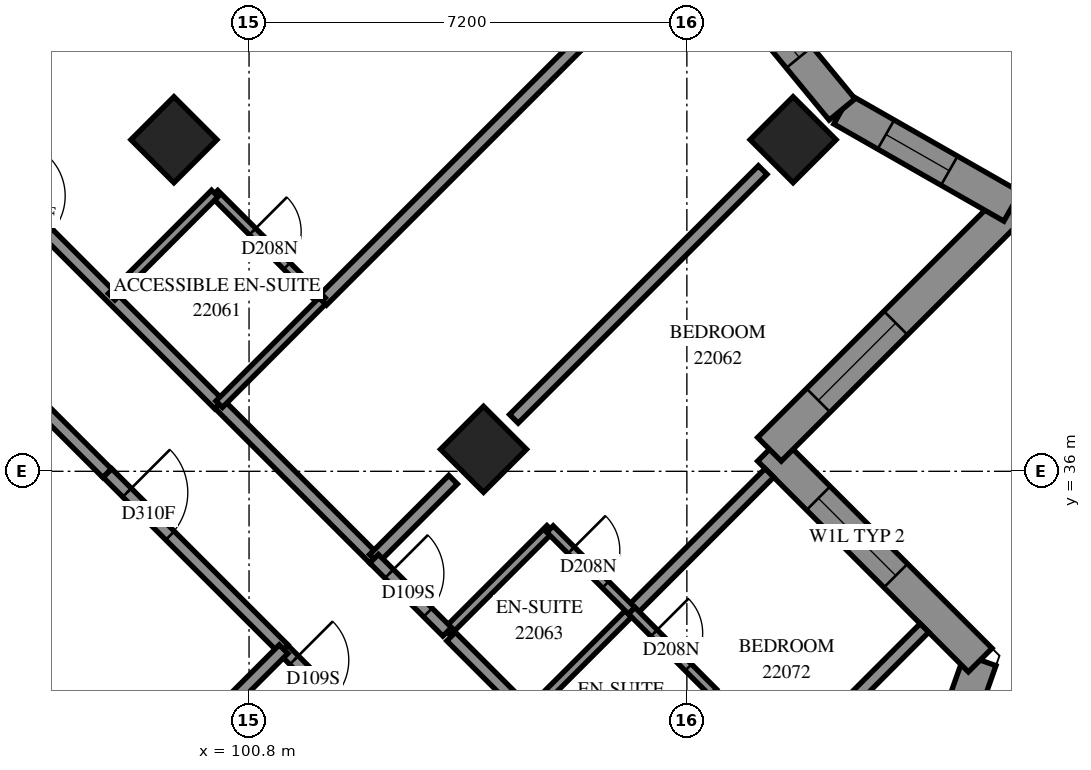
"""IFC4 building model, lengths in metres.
Left out: names, types, materials, properties, quantities, classifications, styles, units other than length and angle.
Written with IfcOpenShell. Run it as: python <this file> out.ifc"""

import sys

from ifc_helpers import new_model, si_unit, direction, frame, frame_2d, origin, origin_2d, place, context, subcontext, project, spatial, polyline, rectangle, outline, extrude, element, fill, save


model = new_model("IFC4")
c1 = context("Model", 3, precision=1e-05, world=origin(), true_north=direction((0.0, 1.0)))
c2 = subcontext(c1, "Body", "Model", "MODEL_VIEW")
j1 = project(units=[si_unit("LENGTHUNIT", "METRE"), si_unit("PLANEANGLEUNIT", "RADIAN")], contexts=[c1])
p1 = place(None, origin())
s1 = spatial("IfcSite", under=j1, at=p1, CompositionType="ELEMENT")
p2 = place(p1, origin())
s2 = spatial("IfcBuilding", under=s1, at=p2, CompositionType="ELEMENT")
p3 = place(p2, frame((0.0, 0.0, 84.6)))
s3 = spatial("IfcBuildingStorey", under=s2, at=p3, CompositionType="ELEMENT", Elevation=84.6)
for number, where, z_axis, x_axis in (
    (1, (99.565, 41.453, 0.0), (0.0, 0.0, 1.0), (0.707, -0.707, 0.0)),
    (2, (109.747, 41.453, 0.0), (0.0, 0.0, 1.0), (0.707, -0.707, 0.0)),
    (3, (104.656, 36.362, 0.0), (0.0, 0.0, 1.0), (0.707, -0.707, 0.0)),
):
    element("IfcColumn", number, at=place(p3, frame(where, z_axis=z_axis, x_axis=x_axis)), inside=s3, PredefinedType="COLUMN", context=c2, shape_type="SweptSolid", body=[
        extrude(rectangle(XDim=1.0, YDim=1.0, at=origin_2d()), origin(), (0.0, 0.0, 1.0), 3.1),
    ])
p4 = place(p3, frame((87.12, 38.625, -0.3), z_axis=(0.0, 0.0, 1.0), x_axis=(0.7071067812, 0.7071067812, 0.0)))
e4 = element("IfcWall", 4, at=p4, inside=s3, PredefinedType="SHEAR", context=c2, shape_type="SweptSolid", body=[
    extrude(rectangle(XDim=14.4, YDim=0.8, at=frame_2d((7.2, 0.0))), origin(), (0.0, 0.0, 1.0), 2.7),
])
p5 = place(p4, frame((4.55, 0.0, 0.3)))
e5 = element("IfcOpeningElement", 5, at=p5, cuts=e4, PredefinedType="OPENING", context=c2, shape_type="SweptSolid", body=[
    extrude(rectangle(XDim=1.1, YDim=2.1, at=frame_2d((0.55, 1.05))), frame((0.0, 0.41, 0.0), z_axis=(0.0, -1.0, 0.0), x_axis=(1.0, 0.0, 0.0)), (0.0, 0.0, 1.0), 0.82),
])
p6 = place(p4, frame((11.35, 0.0, 0.3)))
e6 = element("IfcOpeningElement", 6, at=p6, cuts=e4, PredefinedType="OPENING", context=c2, shape_type="SweptSolid", body=[
    extrude(rectangle(XDim=1.1, YDim=2.1, at=frame_2d((0.55, 1.05))), frame((0.0, 0.41, 0.0), z_axis=(0.0, -1.0, 0.0), x_axis=(1.0, 0.0, 0.0)), (0.0, 0.0, 1.0), 0.82),
])
p7 = place(p3, frame((111.062, 27.922, 0.0), z_axis=(0.0, 0.0, 1.0), x_axis=(0.3338559134, 0.9426241187, 0.0)))
e7 = element("IfcWall", 7, at=p7, inside=s3, PredefinedType="SOLIDWALL", context=c2, shape_type="SweptSolid", body=[
    extrude(outline(polyline([(-0.126, -0.275), (5.45, -0.275), (5.103, 0.275), (0.126, 0.275), (-0.126, -0.275)])), origin(), (0.0, 0.0, 1.0), 3.1),
])
p8 = place(p7, frame((1.441, 0.0, 0.5)))
e8 = element("IfcOpeningElement", 8, at=p8, cuts=e7, PredefinedType="OPENING", context=c2, shape_type="SweptSolid", body=[
    extrude(rectangle(XDim=1.3, YDim=2.45, at=frame_2d((0.65, 1.225))), frame((0.0, 0.285, 0.0), z_axis=(0.0, -1.0, 0.0), x_axis=(1.0, 0.0, 0.0)), (0.0, 0.0, 1.0), 0.57),
])
p9 = place(p7, frame((2.941, 0.0, 0.5)))
e9 = element("IfcOpeningElement", 9, at=p9, cuts=e7, PredefinedType="OPENING", context=c2, shape_type="SweptSolid", body=[
    extrude(rectangle(XDim=1.3, YDim=2.45, at=frame_2d((0.65, 1.225))), frame((0.0, 0.285, 0.0), z_axis=(0.0, -1.0, 0.0), x_axis=(1.0, 0.0, 0.0)), (0.0, 0.0, 1.0), 0.57),
])
p10 = place(p3, frame((112.824, 32.896, 0.0), z_axis=(0.0, 0.0, 1.0), x_axis=(-0.7070965801, 0.7071169822, 0.0)))
e10 = element("IfcWall", 10, at=p10, inside=s3, PredefinedType="SOLIDWALL", context=c2, shape_type="SweptSolid", body=[
    extrude(outline(polyline([(-0.173, -0.275), (4.627, -0.275), (5.176, 0.275), (0.173, 0.275), (-0.173, -0.275)])), origin(), (0.0, 0.0, 1.0), 3.1),
])
p11 = place(p10, frame((1.964, 0.0, 0.6)))
e11 = element("IfcOpeningElement", 11, at=p11, cuts=e10, PredefinedType="OPENING", context=c2, shape_type="SweptSolid", body=[
    extrude(rectangle(XDim=1.8, YDim=1.9, at=frame_2d((0.9, 0.95))), frame((0.0, 0.285, 0.0), z_axis=(0.0, -1.0, 0.0), x_axis=(1.0, 0.0, 0.0)), (0.0, 0.0, 1.0), 0.57),
])
p12 = place(p3, frame((109.358, 36.362, 0.0), z_axis=(0.0, 0.0, 1.0), x_axis=(0.7071067812, 0.7071067812, 0.0)))
e12 = element("IfcWall", 12, at=p12, inside=s3, PredefinedType="SOLIDWALL", context=c2, shape_type="SweptSolid", body=[
    extrude(outline(polyline([(0.275, -0.275), (6.005, -0.275), (5.285, 0.275), (-0.275, 0.275), (0.275, -0.275)])), origin(), (0.0, 0.0, 1.0), 3.1),
])
p13 = place(p12, frame((1.137, 0.0, 0.6)))
e13 = element("IfcOpeningElement", 13, at=p13, cuts=e12, PredefinedType="OPENING", context=c2, shape_type="SweptSolid", body=[
    extrude(rectangle(XDim=1.8, YDim=1.9, at=frame_2d((0.9, 0.95))), frame((0.0, 0.285, 0.0), z_axis=(0.0, -1.0, 0.0), x_axis=(1.0, 0.0, 0.0)), (0.0, 0.0, 1.0), 0.57),
])
p14 = place(p3, frame((113.35, 40.353, 0.0), z_axis=(0.0, 0.0, 1.0), x_axis=(-0.8684016794, 0.4958613951, 0.0)))
e14 = element("IfcWall", 14, at=p14, inside=s3, PredefinedType="SOLIDWALL", context=c2, shape_type="SweptSolid", body=[
    extrude(outline(polyline([(-0.36, -0.275), (3.17, -0.275), (3.271, 0.275), (0.36, 0.275), (-0.36, -0.275)])), origin(), (0.0, 0.0, 1.0), 3.1),
])
p15 = place(p14, frame((1.19, 0.0, 0.5)))
e15 = element("IfcOpeningElement", 15, at=p15, cuts=e14, PredefinedType="OPENING", context=c2, shape_type="SweptSolid", body=[
    extrude(rectangle(XDim=1.2, YDim=2.45, at=frame_2d((0.6, 1.225))), frame((0.0, 0.285, 0.0), z_axis=(0.0, -1.0, 0.0), x_axis=(1.0, 0.0, 0.0)), (0.0, 0.0, 1.0), 0.57),
])
p16 = place(p3, frame((110.553, 41.95, 0.0), z_axis=(0.0, 0.0, 1.0), x_axis=(-0.6356085732, 0.7720114906, 0.0)))
e16 = element("IfcWall", 16, at=p16, inside=s3, PredefinedType="SOLIDWALL", context=c2, shape_type="SweptSolid", body=[
    extrude(outline(polyline([(0.051, -0.275), (3.472, -0.275), (3.419, 0.275), (-0.051, 0.275), (0.051, -0.275)])), origin(), (0.0, 0.0, 1.0), 3.1),
])
p17 = place(p16, frame((1.109, 0.0, 0.5)))
e17 = element("IfcOpeningElement", 17, at=p17, cuts=e16, PredefinedType="OPENING", context=c2, shape_type="SweptSolid", body=[
    extrude(rectangle(XDim=1.2, YDim=2.45, at=frame_2d((0.6, 1.225))), frame((0.0, 0.285, 0.0), z_axis=(0.0, -1.0, 0.0), x_axis=(1.0, 0.0, 0.0)), (0.0, 0.0, 1.0), 0.57),
])
p18 = place(p3, frame((95.215, 42.197, 0.0), z_axis=(0.0, 0.0, 1.0), x_axis=(0.7071114753, 0.7071020871, 0.0)))
e18 = element("IfcWall", 18, at=p18, inside=s3, PredefinedType="PARTITIONING", context=c2, shape_type="SweptSolid", body=[
    extrude(rectangle(XDim=10.652, YDim=0.2, at=frame_2d((5.326, 0.0))), origin(), (0.0, 0.0, 1.0), 3.1),
])
p19 = place(p3, frame((94.294, 43.111, 0.0), z_axis=(0.0, 0.0, 1.0), x_axis=(0.7071067812, -0.7071067812, 0.0)))
e19 = element("IfcWall", 19, at=p19, inside=s3, PredefinedType="PARTITIONING", context=c2, shape_type="SweptSolid", body=[
    extrude(rectangle(XDim=8.499, YDim=0.2, at=frame_2d((4.25, 0.0))), origin(), (0.0, 0.0, 1.0), 3.1),
])
p20 = place(p19, frame((3.651, 0.0, 0.0)))
e20 = element("IfcOpeningElement", 20, at=p20, cuts=e19, PredefinedType="OPENING", context=c2, shape_type="SweptSolid", body=[
    extrude(rectangle(XDim=0.9, YDim=2.1, at=frame_2d((0.45, 1.05))), frame((0.0, 0.11, 0.0), z_axis=(0.0, -1.0, 0.0), x_axis=(1.0, 0.0, 0.0)), (0.0, 0.0, 1.0), 0.22),
])
p21 = place(p3, frame((102.002, 38.804, 0.0), z_axis=(0.0, 0.0, 1.0), x_axis=(0.7072394704, 0.7069740671, 0.0)))
e21 = element("IfcWall", 21, at=p21, inside=s3, PredefinedType="PARTITIONING", context=c2, shape_type="SweptSolid", body=[
    extrude(rectangle(XDim=8.289, YDim=0.2, at=frame_2d((4.145, 0.0))), origin(), (0.0, 0.0, 1.0), 3.1),
])
p22 = place(p3, frame((101.365, 33.071, 0.0), z_axis=(0.0, 0.0, 1.0), x_axis=(0.7071067812, -0.7071067812, 0.0)))
e22 = element("IfcWall", 22, at=p22, inside=s3, PredefinedType="PARTITIONING", context=c2, shape_type="SweptSolid", body=[
    extrude(rectangle(XDim=7.2, YDim=0.2, at=frame_2d((3.6, 0.0))), origin(), (0.0, 0.0, 1.0), 3.1),
])
p23 = place(p22, frame((0.248, 0.0, 0.0)))
e23 = element("IfcOpeningElement", 23, at=p23, cuts=e22, PredefinedType="OPENING", context=c2, shape_type="SweptSolid", body=[
    extrude(rectangle(XDim=0.9, YDim=2.1, at=frame_2d((0.45, 1.05))), frame((0.0, 0.11, 0.0), z_axis=(0.0, -1.0, 0.0), x_axis=(1.0, 0.0, 0.0)), (0.0, 0.0, 1.0), 0.22),
])
p24 = place(p22, frame((5.95, 0.0, 0.0)))
e24 = element("IfcOpeningElement", 24, at=p24, cuts=e22, PredefinedType="OPENING", context=c2, shape_type="SweptSolid", body=[
    extrude(rectangle(XDim=0.9, YDim=2.1, at=frame_2d((0.45, 1.05))), frame((0.0, 0.11, 0.0), z_axis=(0.0, -1.0, 0.0), x_axis=(1.0, 0.0, 0.0)), (0.0, 0.0, 1.0), 0.22),
])
p25 = place(p3, frame((105.155, 36.863, 0.0), z_axis=(0.0, 0.0, 1.0), x_axis=(0.7071067812, 0.7071067812, 0.0)))
e25 = element("IfcWall", 25, at=p25, inside=s3, PredefinedType="PARTITIONING", context=c2, shape_type="SweptSolid", body=[
    extrude(rectangle(XDim=5.787, YDim=0.2, at=frame_2d((2.893, 0.0))), origin(), (0.0, 0.0, 1.0), 3.1),
])
p26 = place(p3, frame((104.123, 33.282, 0.0), z_axis=(0.0, 0.0, 1.0), x_axis=(0.7071067812, -0.7071067812, 0.0)))
e26 = element("IfcWall", 26, at=p26, inside=s3, PredefinedType="PARTITIONING", context=c2, shape_type="SweptSolid", body=[
    extrude(rectangle(XDim=5.399, YDim=0.2, at=frame_2d((2.7, 0.0))), origin(), (0.0, 0.0, 1.0), 3.1),
])
p27 = place(p26, frame((4.08, 0.0, 0.0)))
e27 = element("IfcOpeningElement", 27, at=p27, cuts=e26, PredefinedType="OPENING", context=c2, shape_type="SweptSolid", body=[
    extrude(rectangle(XDim=0.9, YDim=2.1, at=frame_2d((0.45, 1.05))), frame((0.0, 0.11, 0.0), z_axis=(0.0, -1.0, 0.0), x_axis=(1.0, 0.0, 0.0)), (0.0, 0.0, 1.0), 0.22),
])
p28 = place(p3, frame((98.469, 35.973, 0.0), z_axis=(0.0, 0.0, 1.0), x_axis=(0.7073506531, -0.7068628251, 0.0)))
e28 = element("IfcWall", 28, at=p28, inside=s3, PredefinedType="PARTITIONING", context=c2, shape_type="SweptSolid", body=[
    extrude(rectangle(XDim=4.1, YDim=0.2, at=frame_2d((2.05, 0.0))), origin(), (0.0, 0.0, 1.0), 3.1),
])
p29 = place(p28, frame((0.457, 0.0, 0.0)))
e29 = element("IfcOpeningElement", 29, at=p29, cuts=e28, PredefinedType="OPENING", context=c2, shape_type="SweptSolid", body=[
    extrude(rectangle(XDim=1.0, YDim=2.1, at=frame_2d((0.5, 1.05))), frame((0.0, 0.11, 0.0), z_axis=(0.0, -1.0, 0.0), x_axis=(1.0, 0.0, 0.0)), (0.0, 0.0, 1.0), 0.22),
])
p30 = place(p3, frame((100.31, 37.106, 0.0), z_axis=(0.0, 0.0, 1.0), x_axis=(0.7073845681, -0.7068288851, 0.0)))
e30 = element("IfcWall", 30, at=p30, inside=s3, PredefinedType="PARTITIONING", context=c2, shape_type="SweptSolid", body=[
    extrude(rectangle(XDim=3.599, YDim=0.2, at=frame_2d((1.8, 0.0))), origin(), (0.0, 0.0, 1.0), 3.1),
])
p31 = place(p3, frame((107.095, 33.711, 0.0), z_axis=(0.0, 0.0, 1.0), x_axis=(0.7071067812, 0.7071067812, 0.0)))
e31 = element("IfcWall", 31, at=p31, inside=s3, PredefinedType="PARTITIONING", context=c2, shape_type="SweptSolid", body=[
    extrude(rectangle(XDim=3.2, YDim=0.2, at=frame_2d((1.6, 0.0))), origin(), (0.0, 0.0, 1.0), 3.1),
])
p32 = place(p3, frame((96.274, 38.162, 0.0), z_axis=(0.0, 0.0, 1.0), x_axis=(0.7071067812, -0.7071067812, 0.0)))
e32 = element("IfcWall", 32, at=p32, inside=s3, PredefinedType="PARTITIONING", context=c2, shape_type="SweptSolid", body=[
    extrude(rectangle(XDim=3.1, YDim=0.2, at=frame_2d((1.55, 0.0))), origin(), (0.0, 0.0, 1.0), 3.1),
])
p33 = place(p3, frame((100.233, 40.567, 0.0), z_axis=(0.0, 0.0, 1.0), x_axis=(0.7071067812, -0.7071067812, 0.0)))
e33 = element("IfcWall", 33, at=p33, inside=s3, PredefinedType="PARTITIONING", context=c2, shape_type="SweptSolid", body=[
    extrude(rectangle(XDim=2.5, YDim=0.15, at=frame_2d((1.25, 0.0))), origin(), (0.0, 0.0, 1.0), 3.1),
])
p34 = place(p33, frame((0.883, 0.0, 0.0)))
e34 = element("IfcOpeningElement", 34, at=p34, cuts=e33, PredefinedType="OPENING", context=c2, shape_type="SweptSolid", body=[
    extrude(rectangle(XDim=0.8, YDim=2.1, at=frame_2d((0.4, 1.05))), frame((0.0, 0.085, 0.0), z_axis=(0.0, -1.0, 0.0), x_axis=(1.0, 0.0, 0.0)), (0.0, 0.0, 1.0), 0.17),
])
for number, where, z_axis, x_axis in (
    (35, (98.541, 38.871, 0.0), (0.0, 0.0, 1.0), (0.707, 0.708, 0.0)),
    (36, (100.308, 37.103, 0.0), (0.0, 0.0, 1.0), (0.707, 0.708, 0.0)),
    (37, (105.396, 32.016, 0.0), (0.0, 0.0, 1.0), (0.708, 0.707, 0.0)),
):
    element("IfcWall", number, at=place(p3, frame(where, z_axis=z_axis, x_axis=x_axis)), inside=s3, PredefinedType="PARTITIONING", context=c2, shape_type="SweptSolid", body=[
        extrude(rectangle(XDim=2.4, YDim=0.15, at=frame_2d((1.2, 0.0))), origin(), (0.0, 0.0, 1.0), 3.1),
    ])
for number, where, z_axis, x_axis in (
    (38, (104.055, 33.359, 0.0), (0.0, 0.0, 1.0), (0.707, 0.707, 0.0)),
    (39, (106.741, 30.671, 0.0), (0.0, 0.0, 1.0), (0.707, 0.707, 0.0)),
):
    element("IfcWall", number, at=place(p3, frame(where, z_axis=z_axis, x_axis=x_axis)), inside=s3, PredefinedType="PARTITIONING", context=c2, shape_type="SweptSolid", body=[
        extrude(rectangle(XDim=2.398, YDim=0.15, at=frame_2d((1.199, 0.0))), origin(), (0.0, 0.0, 1.0), 3.1),
    ])
p35 = place(p3, frame((110.251, 31.767, 0.0), z_axis=(0.0, 0.0, 1.0), x_axis=(0.7066584143, 0.7075548639, 0.0)))
e40 = element("IfcWall", 40, at=p35, inside=s3, PredefinedType="PARTITIONING", context=c2, shape_type="SweptSolid", body=[
    extrude(rectangle(XDim=2.343, YDim=0.2, at=frame_2d((1.171, 0.0))), origin(), (0.0, 0.0, 1.0), 3.1),
])
p36 = place(p3, frame((105.749, 35.051, 0.0), z_axis=(0.0, 0.0, 1.0), x_axis=(0.7071067812, -0.7071067812, 0.0)))
e41 = element("IfcWall", 41, at=p36, inside=s3, PredefinedType="PARTITIONING", context=c2, shape_type="SweptSolid", body=[
    extrude(rectangle(XDim=1.901, YDim=0.15, at=frame_2d((0.95, 0.0))), origin(), (0.0, 0.0, 1.0), 3.1),
])
p37 = place(p36, frame((0.493, 0.0, 0.0)))
e42 = element("IfcOpeningElement", 42, at=p37, cuts=e41, PredefinedType="OPENING", context=c2, shape_type="SweptSolid", body=[
    extrude(rectangle(XDim=0.8, YDim=2.1, at=frame_2d((0.4, 1.05))), frame((0.0, 0.085, 0.0), z_axis=(0.0, -1.0, 0.0), x_axis=(1.0, 0.0, 0.0)), (0.0, 0.0, 1.0), 0.17),
])
p38 = place(p3, frame((107.094, 33.708, 0.0), z_axis=(0.0, 0.0, 1.0), x_axis=(0.7065800724, -0.7076330979, 0.0)))
e43 = element("IfcWall", 43, at=p38, inside=s3, PredefinedType="PARTITIONING", context=c2, shape_type="SweptSolid", body=[
    extrude(rectangle(XDim=1.899, YDim=0.15, at=frame_2d((0.95, 0.0))), origin(), (0.0, 0.0, 1.0), 3.1),
])
p39 = place(p38, frame((0.519, 0.0, 0.0)))
e44 = element("IfcOpeningElement", 44, at=p39, cuts=e43, PredefinedType="OPENING", context=c2, shape_type="SweptSolid", body=[
    extrude(rectangle(XDim=0.8, YDim=2.1, at=frame_2d((0.4, 1.05))), frame((0.0, 0.085, 0.0), z_axis=(0.0, -1.0, 0.0), x_axis=(1.0, 0.0, 0.0)), (0.0, 0.0, 1.0), 0.17),
])
p40 = place(p3, frame((100.063, 31.771, 0.0), z_axis=(0.0, 0.0, 1.0), x_axis=(0.7071067812, 0.7071067812, 0.0)))
e45 = element("IfcWall", 45, at=p40, inside=s3, PredefinedType="PARTITIONING", context=c2, shape_type="SweptSolid", body=[
    extrude(rectangle(XDim=1.844, YDim=0.2, at=frame_2d((0.922, 0.0))), origin(), (0.0, 0.0, 1.0), 3.1),
])
p41 = place(p3, frame((102.853, 34.561, 0.0), z_axis=(0.0, 0.0, 1.0), x_axis=(0.7071067812, 0.7071067812, 0.0)))
e46 = element("IfcWall", 46, at=p41, inside=s3, PredefinedType="PARTITIONING", context=c2, shape_type="SweptSolid", body=[
    extrude(rectangle(XDim=1.841, YDim=0.2, at=frame_2d((0.921, 0.0))), origin(), (0.0, 0.0, 1.0), 3.1),
])
p42 = place(p3, frame((102.857, 34.563, 0.0), z_axis=(0.0, 0.0, 1.0), x_axis=(0.7071067812, -0.7071067812, 0.0)))
e47 = element("IfcWall", 47, at=p42, inside=s3, PredefinedType="PARTITIONING", context=c2, shape_type="SweptSolid", body=[
    extrude(rectangle(XDim=1.7, YDim=0.2, at=frame_2d((0.85, 0.0))), origin(), (0.0, 0.0, 1.0), 3.1),
])
p43 = place(p42, frame((0.35, 0.0, 0.0)))
e48 = element("IfcOpeningElement", 48, at=p43, cuts=e47, PredefinedType="OPENING", context=c2, shape_type="SweptSolid", body=[
    extrude(rectangle(XDim=0.9, YDim=2.1, at=frame_2d((0.45, 1.05))), frame((0.0, 0.11, 0.0), z_axis=(0.0, -1.0, 0.0), x_axis=(1.0, 0.0, 0.0)), (0.0, 0.0, 1.0), 0.22),
])
p44 = place(p11, origin())
e49 = element("IfcWindow", 49, at=p44, inside=s3, PartitioningType="SINGLE_PANEL", PredefinedType="WINDOW", context=c2, shape_type="SweptSolid", body=[
    extrude(rectangle(XDim=1.8, YDim=1.9, at=frame_2d((0.9, 0.95))), frame((0.0, 0.155, 0.0), z_axis=(0.0, -1.0, 0.0), x_axis=(1.0, 0.0, 0.0)), (0.0, 0.0, 1.0), 0.06),
])
fill(e11, e49)
p45 = place(p13, origin())
e50 = element("IfcWindow", 50, at=p45, inside=s3, PartitioningType="SINGLE_PANEL", PredefinedType="WINDOW", context=c2, shape_type="SweptSolid", body=[
    extrude(rectangle(XDim=1.8, YDim=1.9, at=frame_2d((0.9, 0.95))), frame((0.0, 0.155, 0.0), z_axis=(0.0, -1.0, 0.0), x_axis=(1.0, 0.0, 0.0)), (0.0, 0.0, 1.0), 0.06),
])
fill(e13, e50)
p46 = place(p15, origin())
e51 = element("IfcWindow", 51, at=p46, inside=s3, PartitioningType="SINGLE_PANEL", PredefinedType="WINDOW", context=c2, shape_type="SweptSolid", body=[
    extrude(rectangle(XDim=1.2, YDim=2.45, at=frame_2d((0.6, 1.225))), frame((0.0, 0.155, 0.0), z_axis=(0.0, -1.0, 0.0), x_axis=(1.0, 0.0, 0.0)), (0.0, 0.0, 1.0), 0.06),
])
fill(e15, e51)
p47 = place(p17, origin())
e52 = element("IfcWindow", 52, at=p47, inside=s3, PartitioningType="SINGLE_PANEL", PredefinedType="WINDOW", context=c2, shape_type="SweptSolid", body=[
    extrude(rectangle(XDim=1.2, YDim=2.45, at=frame_2d((0.6, 1.225))), frame((0.0, 0.155, 0.0), z_axis=(0.0, -1.0, 0.0), x_axis=(1.0, 0.0, 0.0)), (0.0, 0.0, 1.0), 0.06),
])
fill(e17, e52)
p48 = place(p34, origin())
e53 = element("IfcDoor", 53, at=p48, inside=s3, OperationType="SINGLE_SWING_RIGHT", PredefinedType="DOOR", context=c2, shape_type="SweptSolid", body=[
    extrude(rectangle(XDim=0.8, YDim=2.1, at=frame_2d((0.4, 1.05))), frame((0.0, 0.025, 0.0), z_axis=(0.0, -1.0, 0.0), x_axis=(1.0, 0.0, 0.0)), (0.0, 0.0, 1.0), 0.05),
])
fill(e34, e53)
p49 = place(p43, origin())
e54 = element("IfcDoor", 54, at=p49, inside=s3, OperationType="SINGLE_SWING_LEFT", PredefinedType="DOOR", context=c2, shape_type="SweptSolid", body=[
    extrude(rectangle(XDim=0.9, YDim=2.1, at=frame_2d((0.45, 1.05))), frame((0.0, 0.025, 0.0), z_axis=(0.0, -1.0, 0.0), x_axis=(1.0, 0.0, 0.0)), (0.0, 0.0, 1.0), 0.05),
])
fill(e48, e54)
p50 = place(p37, origin())
e55 = element("IfcDoor", 55, at=p50, inside=s3, OperationType="SINGLE_SWING_RIGHT", PredefinedType="DOOR", context=c2, shape_type="SweptSolid", body=[
    extrude(rectangle(XDim=0.8, YDim=2.1, at=frame_2d((0.4, 1.05))), frame((0.0, 0.025, 0.0), z_axis=(0.0, -1.0, 0.0), x_axis=(1.0, 0.0, 0.0)), (0.0, 0.0, 1.0), 0.05),
])
fill(e42, e55)
p51 = place(p29, origin())
e56 = element("IfcDoor", 56, at=p51, inside=s3, OperationType="SINGLE_SWING_RIGHT", PredefinedType="DOOR", context=c2, shape_type="SweptSolid", body=[
    extrude(rectangle(XDim=1.0, YDim=2.1, at=frame_2d((0.5, 1.05))), frame((0.0, 0.025, 0.0), z_axis=(0.0, -1.0, 0.0), x_axis=(1.0, 0.0, 0.0)), (0.0, 0.0, 1.0), 0.05),
])
fill(e29, e56)
p52 = place(p23, origin())
e57 = element("IfcDoor", 57, at=p52, inside=s3, OperationType="SINGLE_SWING_RIGHT", PredefinedType="DOOR", context=c2, shape_type="SweptSolid", body=[
    extrude(rectangle(XDim=0.9, YDim=2.1, at=frame_2d((0.45, 1.05))), frame((0.0, 0.025, 0.0), z_axis=(0.0, -1.0, 0.0), x_axis=(1.0, 0.0, 0.0)), (0.0, 0.0, 1.0), 0.05),
])
fill(e23, e57)
p53 = place(p39, origin())
e58 = element("IfcDoor", 58, at=p53, inside=s3, OperationType="SINGLE_SWING_RIGHT", PredefinedType="DOOR", context=c2, shape_type="SweptSolid", body=[
    extrude(rectangle(XDim=0.8, YDim=2.1, at=frame_2d((0.4, 1.05))), frame((0.0, 0.025, 0.0), z_axis=(0.0, -1.0, 0.0), x_axis=(1.0, 0.0, 0.0)), (0.0, 0.0, 1.0), 0.05),
])
fill(e44, e58)
save(model, sys.argv[1])
